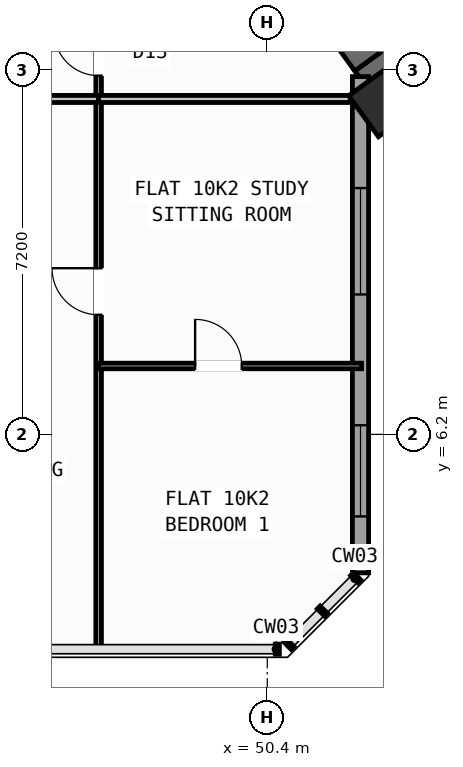
"""IFC4 building model, lengths in metres.
Left out: names, types, materials, properties, quantities, classifications, styles, units other than length and angle.
Written with IfcOpenShell. Run it as: python <this file> out.ifc"""

import sys

from ifc_helpers import new_model, si_unit, direction, frame, frame_2d, origin, origin_2d, place, context, subcontext, project, spatial, rectangle, hollow_rectangle, extrude, source, transform, mapped, element, fill, save


model = new_model("IFC4")
c1 = context("Model", 3, precision=1e-05, world=origin(), true_north=direction((0.0, 1.0)))
c2 = subcontext(c1, "Body", "Model", "MODEL_VIEW")
j1 = project(units=[si_unit("LENGTHUNIT", "METRE"), si_unit("PLANEANGLEUNIT", "RADIAN")], contexts=[c1])
p1 = place(None, origin())
s1 = spatial("IfcSite", under=j1, at=p1, CompositionType="ELEMENT")
p2 = place(p1, origin())
s2 = spatial("IfcBuilding", under=s1, at=p2, CompositionType="ELEMENT")
p3 = place(p2, frame((0.0, 0.0, 42.0)))
s3 = spatial("IfcBuildingStorey", under=s2, at=p3, CompositionType="ELEMENT", Elevation=42.0)
p4 = place(p3, frame((52.318, 13.11, 0.0), z_axis=(0.0, 0.0, 1.0), x_axis=(0.809019445368, 0.587781878776, 0.0)))
e1 = element("IfcWall", 1, at=p4, inside=s3, PredefinedType="SHEAR", context=c2, shape_type="SweptSolid", body=[
    extrude(rectangle(XDim=12.44, YDim=0.65, at=frame_2d((6.22, 0.0))), origin(), (0.0, 0.0, 1.0), 3.35),
])
p5 = place(p3, frame((52.39, 13.564, 0.0), z_axis=(0.0, 0.0, 1.0), x_axis=(-0.58779688989, 0.809008539037, 0.0)))
e2 = element("IfcWall", 2, at=p5, inside=s3, PredefinedType="SHEAR", context=c2, shape_type="SweptSolid", body=[
    extrude(rectangle(XDim=3.525, YDim=0.65, at=frame_2d((1.763, 0.0))), origin(), (0.0, 0.0, 1.0), 3.35),
])
m1 = source(origin(), c2, "Body", "SweptSolid", [
    extrude(hollow_rectangle(XDim=1.0, YDim=1.0, WallThickness=0.04, at=origin_2d()), origin(), (0.0, 0.0, 1.0), 3.6),
])
p6 = place(p3, frame((52.705, 12.773, 0.0), z_axis=(0.0, 0.0, 1.0), x_axis=(0.809016994375, 0.587785252292, 0.0)))
e3 = element("IfcColumn", 3, at=p6, inside=s3, PredefinedType="COLUMN", context=c2, shape_type="MappedRepresentation", body=[
    mapped(m1, transform((0.0, 0.0, 0.0), scale=1.0)),
])
p7 = place(p3, frame((56.581, 7.439, 0.0), z_axis=(0.0, 0.0, 1.0), x_axis=(-0.587785875463, 0.809016541614, 0.0)))
e4 = element("IfcWall", 4, at=p7, inside=s3, PredefinedType="STANDARD", context=c2, shape_type="SweptSolid", body=[
    extrude(rectangle(XDim=6.774, YDim=0.32, at=frame_2d((3.387, 0.0))), origin(), (0.0, 0.0, 1.0), 2.725),
])
p8 = place(p7, frame((1.556, 0.0, 0.8)))
e5 = element("IfcOpeningElement", 5, at=p8, cuts=e4, PredefinedType="OPENING", context=c2, shape_type="SweptSolid", body=[
    extrude(rectangle(XDim=2.1, YDim=1.55, at=frame_2d((1.05, 0.775))), frame((0.0, 0.17, 0.0), z_axis=(0.0, -1.0, 0.0), x_axis=(1.0, 0.0, 0.0)), (0.0, 0.0, 1.0), 0.34),
])
p9 = place(p3, frame((52.24, 13.261, 0.0), z_axis=(0.0, 0.0, 1.0), x_axis=(0.0, -1.0, 0.0)))
e6 = element("IfcWall", 6, at=p9, inside=s3, PredefinedType="STANDARD", context=c2, shape_type="SweptSolid", body=[
    extrude(rectangle(XDim=9.795, YDim=0.32, at=frame_2d((4.897, 0.0))), origin(), (0.0, 0.0, 1.0), 3.35),
])
p10 = place(p9, frame((2.199, 0.0, 0.8)))
e7 = element("IfcOpeningElement", 7, at=p10, cuts=e6, PredefinedType="OPENING", context=c2, shape_type="SweptSolid", body=[
    extrude(rectangle(XDim=2.1, YDim=1.55, at=frame_2d((1.05, 0.775))), frame((0.0, 0.17, 0.0), z_axis=(0.0, -1.0, 0.0), x_axis=(1.0, 0.0, 0.0)), (0.0, 0.0, 1.0), 0.34),
])
p11 = place(p9, frame((6.88, 0.0, 0.85)))
e8 = element("IfcOpeningElement", 8, at=p11, cuts=e6, PredefinedType="OPENING", context=c2, shape_type="SweptSolid", body=[
    extrude(rectangle(XDim=1.8, YDim=1.5, at=frame_2d((0.9, 0.75))), frame((0.0, 0.17, 0.0), z_axis=(0.0, -1.0, 0.0), x_axis=(1.0, 0.0, 0.0)), (0.0, 0.0, 1.0), 0.34),
])
p12 = place(p3, frame((47.072, 1.96, 0.0), z_axis=(0.0, 0.0, 1.0), x_axis=(0.0, 1.0, 0.0)))
e9 = element("IfcWall", 9, at=p12, inside=s3, PredefinedType="PARTITIONING", context=c2, shape_type="SweptSolid", body=[
    extrude(rectangle(XDim=13.46, YDim=0.11, at=frame_2d((6.73, 0.0))), origin(), (0.0, 0.0, 1.0), 3.34),
])
p13 = place(p12, frame((6.6, 0.0, 0.0)))
e10 = element("IfcOpeningElement", 10, at=p13, cuts=e9, PredefinedType="OPENING", context=c2, shape_type="SweptSolid", body=[
    extrude(rectangle(XDim=0.92, YDim=2.08, at=frame_2d((0.46, 1.04))), frame((0.0, 0.065, 0.0), z_axis=(0.0, -1.0, 0.0), x_axis=(1.0, 0.0, 0.0)), (0.0, 0.0, 1.0), 0.13),
])
p14 = place(p12, frame((11.32, 0.0, 0.0)))
e11 = element("IfcOpeningElement", 11, at=p14, cuts=e9, PredefinedType="OPENING", context=c2, shape_type="SweptSolid", body=[
    extrude(rectangle(XDim=0.88, YDim=2.08, at=frame_2d((0.44, 1.04))), frame((0.0, 0.065, 0.0), z_axis=(0.0, -1.0, 0.0), x_axis=(1.0, 0.0, 0.0)), (0.0, 0.0, 1.0), 0.13),
])
p15 = place(p3, frame((41.95, 12.82, 0.0), z_axis=(0.0, 0.0, 1.0), x_axis=(1.0, 0.0, 0.0)))
e12 = element("IfcWall", 12, at=p15, inside=s3, PredefinedType="PLUMBINGWALL", context=c2, shape_type="SweptSolid", body=[
    extrude(rectangle(XDim=5.122, YDim=0.14, at=frame_2d((2.561, 0.0))), origin(), (0.0, 0.0, 1.0), 2.525),
])
p16 = place(p15, frame((2.101, 0.0, 0.0)))
e13 = element("IfcOpeningElement", 13, at=p16, cuts=e12, PredefinedType="OPENING", context=c2, shape_type="SweptSolid", body=[
    extrude(rectangle(XDim=0.92, YDim=2.08, at=frame_2d((0.46, 1.04))), frame((0.0, 0.08, 0.0), z_axis=(0.0, -1.0, 0.0), x_axis=(1.0, 0.0, 0.0)), (0.0, 0.0, 1.0), 0.16),
])
p17 = place(p3, frame((47.072, 12.82, 0.0), z_axis=(0.0, 0.0, 1.0), x_axis=(1.0, 0.0, 0.0)))
e14 = element("IfcWall", 14, at=p17, inside=s3, PredefinedType="PLUMBINGWALL", context=c2, shape_type="SweptSolid", body=[
    extrude(rectangle(XDim=4.967, YDim=0.14, at=frame_2d((2.483, 0.0))), origin(), (0.0, 0.0, 1.0), 2.525),
])
p18 = place(p3, frame((47.072, 7.55, 0.0), z_axis=(0.0, 0.0, 1.0), x_axis=(1.0, 0.0, 0.0)))
e15 = element("IfcWall", 15, at=p18, inside=s3, PredefinedType="PARTITIONING", context=c2, shape_type="SweptSolid", body=[
    extrude(rectangle(XDim=5.188, YDim=0.11, at=frame_2d((2.594, 0.0))), origin(), (0.0, 0.0, 1.0), 3.34),
])
p19 = place(p18, frame((1.904, 0.0, 0.0)))
e16 = element("IfcOpeningElement", 16, at=p19, cuts=e15, PredefinedType="OPENING", context=c2, shape_type="SweptSolid", body=[
    extrude(rectangle(XDim=0.92, YDim=2.08, at=frame_2d((0.46, 1.04))), frame((0.0, 0.065, 0.0), z_axis=(0.0, -1.0, 0.0), x_axis=(1.0, 0.0, 0.0)), (0.0, 0.0, 1.0), 0.13),
])
m2 = source(origin(), c2, "Body", "SweptSolid", [
    extrude(rectangle(XDim=2.1, YDim=1.55, at=frame_2d((1.05, 0.775))), frame((0.0, 0.03, 0.0), z_axis=(0.0, -1.0, 0.0), x_axis=(1.0, 0.0, 0.0)), (0.0, 0.0, 1.0), 0.06),
])
p20 = place(p10, origin())
e17 = element("IfcWindow", 17, at=p20, inside=s3, PartitioningType="SINGLE_PANEL", PredefinedType="WINDOW", context=c2, shape_type="MappedRepresentation", body=[
    mapped(m2, transform((0.0, 0.0, 0.0), scale=1.0)),
])
fill(e7, e17)
m3 = source(origin(), c2, "Body", "SweptSolid", [
    extrude(rectangle(XDim=1.8, YDim=1.5, at=frame_2d((0.9, 0.75))), frame((0.0, 0.03, 0.0), z_axis=(0.0, -1.0, 0.0), x_axis=(1.0, 0.0, 0.0)), (0.0, 0.0, 1.0), 0.06),
])
p21 = place(p11, origin())
e18 = element("IfcWindow", 18, at=p21, inside=s3, PartitioningType="SINGLE_PANEL", PredefinedType="WINDOW", context=c2, shape_type="MappedRepresentation", body=[
    mapped(m3, transform((0.0, 0.0, 0.0), scale=1.0)),
])
fill(e8, e18)
m4 = source(origin(), c2, "Body", "SweptSolid", [
    extrude(rectangle(XDim=0.92, YDim=2.08, at=frame_2d((0.46, 1.04))), frame((0.0, 0.025, 0.0), z_axis=(0.0, -1.0, 0.0), x_axis=(1.0, 0.0, 0.0)), (0.0, 0.0, 1.0), 0.05),
])
p22 = place(p13, origin())
e19 = element("IfcDoor", 19, at=p22, inside=s3, OperationType="SINGLE_SWING_RIGHT", PredefinedType="DOOR", context=c2, shape_type="MappedRepresentation", body=[
    mapped(m4, transform((0.0, 0.0, 0.0), scale=1.0)),
])
fill(e10, e19)
p23 = place(p19, origin())
e20 = element("IfcDoor", 20, at=p23, inside=s3, OperationType="SINGLE_SWING_LEFT", PredefinedType="DOOR", context=c2, shape_type="MappedRepresentation", body=[
    mapped(m4, transform((0.0, 0.0, 0.0), scale=1.0)),
])
fill(e16, e20)
m5 = source(origin(), c2, "Body", "SweptSolid", [
    extrude(rectangle(XDim=0.88, YDim=2.08, at=frame_2d((0.44, 1.04))), frame((0.0, 0.025, 0.0), z_axis=(0.0, -1.0, 0.0), x_axis=(1.0, 0.0, 0.0)), (0.0, 0.0, 1.0), 0.05),
])
p24 = place(p14, origin())
e21 = element("IfcDoor", 21, at=p24, inside=s3, OperationType="SINGLE_SWING_RIGHT", PredefinedType="DOOR", context=c2, shape_type="MappedRepresentation", body=[
    mapped(m5, transform((0.0, 0.0, 0.0), scale=1.0)),
])
fill(e11, e21)
save(model, sys.argv[1])
